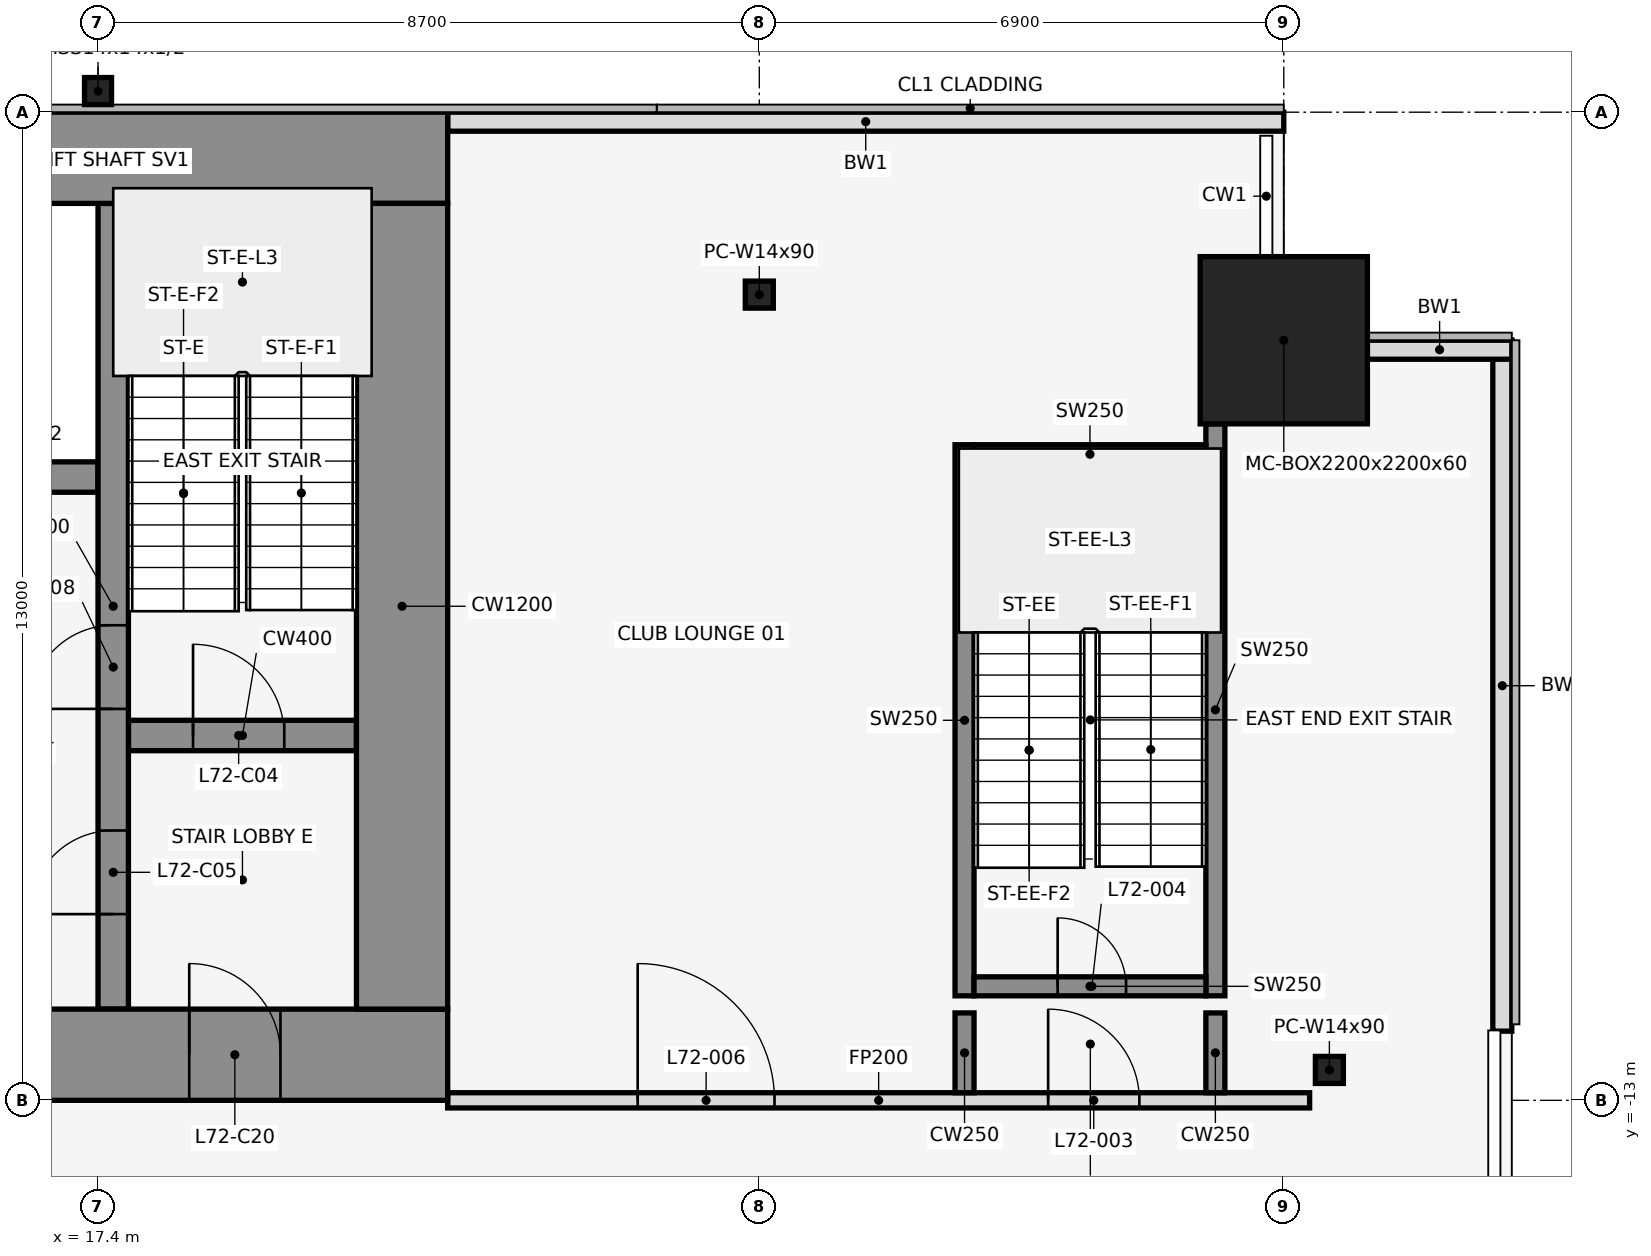
"""IFC4 building model, lengths in metres.
Left out: names, types, materials, properties, quantities, classifications, styles, units other than length and angle.
Written with IfcOpenShell. Run it as: python <this file> out.ifc"""

import sys

from ifc_helpers import new_model, si_unit, direction, frame, frame_2d, origin, origin_2d, place, context, subcontext, project, spatial, rectangle, hollow_rectangle, i_section, extrude, element, fill, save


model = new_model("IFC4")
c1 = context("Model", 3, precision=1e-05, world=origin(), true_north=direction((0.0, 1.0)))
c2 = subcontext(c1, "Body", "Model", "MODEL_VIEW")
j1 = project(units=[si_unit("LENGTHUNIT", "METRE"), si_unit("PLANEANGLEUNIT", "RADIAN")], contexts=[c1])
p1 = place(None, origin())
s1 = spatial("IfcSite", under=j1, at=p1, CompositionType="ELEMENT")
p2 = place(p1, origin())
s2 = spatial("IfcBuilding", under=s1, at=p2, CompositionType="ELEMENT")
p3 = place(p2, frame((0.0, 0.0, 320.0)))
s3 = spatial("IfcBuildingStorey", under=s2, at=p3, CompositionType="ELEMENT", Elevation=320.0)
p4 = place(p3, frame((26.1, -2.4, 0.0), z_axis=(0.0, 0.0, 1.0), x_axis=(1.0, 0.0, 0.0)))
e1 = element("IfcColumn", 1, at=p4, inside=s3, PredefinedType="COLUMN", context=c2, shape_type="SweptSolid", body=[
    extrude(i_section(OverallWidth=0.368, OverallDepth=0.356, WebThickness=0.011, FlangeThickness=0.018, at=origin_2d()), origin(), (0.0, 0.0, 1.0), 4.5),
])
p5 = place(p3, frame((33.0, -3.0, 0.0), z_axis=(0.0, 0.0, 1.0), x_axis=(1.0, 0.0, 0.0)))
e2 = element("IfcColumn", 2, at=p5, inside=s3, PredefinedType="COLUMN", context=c2, shape_type="SweptSolid", body=[
    extrude(hollow_rectangle(XDim=2.2, YDim=2.2, WallThickness=0.06, at=origin_2d()), origin(), (0.0, 0.0, 1.0), 4.5),
])
p6 = place(p3, frame((17.4, 0.278, 0.0), z_axis=(0.0, 0.0, 1.0), x_axis=(1.0, 0.0, 0.0)))
e3 = element("IfcColumn", 3, at=p6, inside=s3, PredefinedType="COLUMN", context=c2, shape_type="SweptSolid", body=[
    extrude(hollow_rectangle(XDim=0.356, YDim=0.356, WallThickness=0.012, at=origin_2d()), origin(), (0.0, 0.0, 1.0), 4.5),
])
p7 = place(p3, frame((33.6, -12.6, 0.0), z_axis=(0.0, 0.0, 1.0), x_axis=(1.0, 0.0, 0.0)))
e4 = element("IfcColumn", 4, at=p7, inside=s3, PredefinedType="COLUMN", context=c2, shape_type="SweptSolid", body=[
    extrude(i_section(OverallWidth=0.368, OverallDepth=0.356, WebThickness=0.011, FlangeThickness=0.018, at=origin_2d()), origin(), (0.0, 0.0, 1.0), 4.5),
])
p8 = place(p3, frame((33.0, -0.125, 0.0), z_axis=(0.0, 0.0, 1.0), x_axis=(-1.0, 0.0, 0.0)))
e5 = element("IfcWall", 5, at=p8, inside=s3, PredefinedType="STANDARD", context=c2, shape_type="SweptSolid", body=[
    extrude(rectangle(XDim=11.0, YDim=0.25, at=frame_2d((5.5, 0.0))), origin(), (0.0, 0.0, 1.0), 4.35),
])
p9 = place(p3, frame((35.875, -12.09, 0.0), z_axis=(0.0, 0.0, 1.0), x_axis=(0.0, 1.0, 0.0)))
e6 = element("IfcWall", 6, at=p9, inside=s3, PredefinedType="STANDARD", context=c2, shape_type="SweptSolid", body=[
    extrude(rectangle(XDim=9.09, YDim=0.25, at=frame_2d((4.545, 0.0))), origin(), (0.0, 0.0, 1.0), 4.35),
])
p10 = place(p3, frame((36.0, -3.125, 0.0), z_axis=(0.0, 0.0, 1.0), x_axis=(-1.0, 0.0, 0.0)))
e7 = element("IfcWall", 7, at=p10, inside=s3, PredefinedType="STANDARD", context=c2, shape_type="SweptSolid", body=[
    extrude(rectangle(XDim=1.9, YDim=0.25, at=frame_2d((0.95, 0.0))), origin(), (0.0, 0.0, 1.0), 4.35),
])
p11 = place(p3, frame((28.8, -11.625, 0.0), z_axis=(0.0, 0.0, 1.0), x_axis=(0.0, 1.0, 0.0)))
e8 = element("IfcWall", 8, at=p11, inside=s3, PredefinedType="SHEAR", context=c2, shape_type="SweptSolid", body=[
    extrude(rectangle(XDim=7.25, YDim=0.25, at=frame_2d((3.625, 0.0))), origin(), (0.0, 0.0, 1.0), 4.5),
])
p12 = place(p3, frame((32.1, -11.625, 0.0), z_axis=(0.0, 0.0, 1.0), x_axis=(0.0, 1.0, 0.0)))
e9 = element("IfcWall", 9, at=p12, inside=s3, PredefinedType="SHEAR", context=c2, shape_type="SweptSolid", body=[
    extrude(rectangle(XDim=7.525, YDim=0.25, at=frame_2d((3.762, 0.0))), origin(), (0.0, 0.0, 1.0), 4.5),
])
p13 = place(p3, frame((28.925, -11.5, 0.0), z_axis=(0.0, 0.0, 1.0), x_axis=(1.0, 0.0, 0.0)))
e10 = element("IfcWall", 10, at=p13, inside=s3, PredefinedType="SHEAR", context=c2, shape_type="SweptSolid", body=[
    extrude(rectangle(XDim=3.05, YDim=0.25, at=frame_2d((1.525, 0.0))), origin(), (0.0, 0.0, 1.0), 4.5),
])
p14 = place(p13, frame((1.1, 0.0, 0.0)))
e11 = element("IfcOpeningElement", 11, at=p14, cuts=e10, PredefinedType="OPENING", context=c2, shape_type="SweptSolid", body=[
    extrude(rectangle(XDim=0.9, YDim=2.1, at=frame_2d((0.45, 1.05))), frame((0.0, 0.137, 0.0), z_axis=(0.0, -1.0, 0.0), x_axis=(1.0, 0.0, 0.0)), (0.0, 0.0, 1.0), 0.274),
])
p15 = place(p3, frame((28.925, -4.5, 0.0), z_axis=(0.0, 0.0, 1.0), x_axis=(1.0, 0.0, 0.0)))
e12 = element("IfcWall", 12, at=p15, inside=s3, PredefinedType="SHEAR", context=c2, shape_type="SweptSolid", body=[
    extrude(rectangle(XDim=3.05, YDim=0.25, at=frame_2d((1.525, 0.0))), origin(), (0.0, 0.0, 1.0), 4.5),
])
p16 = place(p3, frame((22.0, -13.0, 0.0), z_axis=(0.0, 0.0, 1.0), x_axis=(1.0, 0.0, 0.0)))
e13 = element("IfcWall", 13, at=p16, inside=s3, PredefinedType="PARTITIONING", context=c2, shape_type="SweptSolid", body=[
    extrude(rectangle(XDim=11.34, YDim=0.2, at=frame_2d((5.67, 0.0))), origin(), (0.0, 0.0, 1.0), 3.418),
])
p17 = place(p16, frame((7.9, 0.0, 0.0)))
e14 = element("IfcOpeningElement", 14, at=p17, cuts=e13, PredefinedType="OPENING", context=c2, shape_type="SweptSolid", body=[
    extrude(rectangle(XDim=1.2, YDim=2.1, at=frame_2d((0.6, 1.05))), frame((0.0, 0.112, 0.0), z_axis=(0.0, -1.0, 0.0), x_axis=(1.0, 0.0, 0.0)), (0.0, 0.0, 1.0), 0.224),
])
p18 = place(p16, frame((2.5, 0.0, 0.0)))
e15 = element("IfcOpeningElement", 15, at=p18, cuts=e13, PredefinedType="OPENING", context=c2, shape_type="SweptSolid", body=[
    extrude(rectangle(XDim=1.8, YDim=2.1, at=frame_2d((0.9, 1.05))), frame((0.0, 0.112, 0.0), z_axis=(0.0, -1.0, 0.0), x_axis=(1.0, 0.0, 0.0)), (0.0, 0.0, 1.0), 0.224),
])
for number, where, z_axis, x_axis in (
    (16, (28.8, -12.9, 0.0), (0.0, 0.0, 1.0), (0.0, 1.0, 0.0)),
    (17, (32.1, -12.9, 0.0), (0.0, 0.0, 1.0), (0.0, 1.0, 0.0)),
):
    element("IfcWall", number, at=place(p3, frame(where, z_axis=z_axis, x_axis=x_axis)), inside=s3, PredefinedType="SHEAR", context=c2, shape_type="SweptSolid", body=[
        extrude(rectangle(XDim=1.05, YDim=0.25, at=frame_2d((0.525, 0.0))), origin(), (0.0, 0.0, 1.0), 4.5),
    ])
p19 = place(p3, frame((17.8, -8.2, 0.0), z_axis=(0.0, 0.0, 1.0), x_axis=(1.0, 0.0, 0.0)))
e18 = element("IfcWall", 18, at=p19, inside=s3, PredefinedType="SHEAR", context=c2, shape_type="SweptSolid", body=[
    extrude(rectangle(XDim=3.0, YDim=0.4, at=frame_2d((1.5, 0.0))), origin(), (0.0, 0.0, 1.0), 4.5),
])
p20 = place(p19, frame((0.85, 0.0, 0.0)))
e19 = element("IfcOpeningElement", 19, at=p20, cuts=e18, PredefinedType="OPENING", context=c2, shape_type="SweptSolid", body=[
    extrude(rectangle(XDim=1.2, YDim=2.1, at=frame_2d((0.6, 1.05))), frame((0.0, 0.212, 0.0), z_axis=(0.0, -1.0, 0.0), x_axis=(1.0, 0.0, 0.0)), (0.0, 0.0, 1.0), 0.424),
])
p21 = place(p3, frame((3.8, -4.8, 0.0), z_axis=(0.0, 0.0, 1.0), x_axis=(1.0, 0.0, 0.0)))
e20 = element("IfcWall", 20, at=p21, inside=s3, PredefinedType="SHEAR", context=c2, shape_type="SweptSolid", body=[
    extrude(rectangle(XDim=13.6, YDim=0.4, at=frame_2d((6.8, 0.0))), origin(), (0.0, 0.0, 1.0), 4.5),
])
p22 = place(p21, frame((0.75, 0.0, 0.0)))
e21 = element("IfcOpeningElement", 21, at=p22, cuts=e20, PredefinedType="OPENING", context=c2, shape_type="SweptSolid", body=[
    extrude(rectangle(XDim=1.2, YDim=2.1, at=frame_2d((0.6, 1.05))), frame((0.0, 0.212, 0.0), z_axis=(0.0, -1.0, 0.0), x_axis=(1.0, 0.0, 0.0)), (0.0, 0.0, 1.0), 0.424),
])
p23 = place(p21, frame((3.65, 0.0, 0.0)))
e22 = element("IfcOpeningElement", 22, at=p23, cuts=e20, PredefinedType="OPENING", context=c2, shape_type="SweptSolid", body=[
    extrude(rectangle(XDim=1.2, YDim=2.1, at=frame_2d((0.6, 1.05))), frame((0.0, 0.212, 0.0), z_axis=(0.0, -1.0, 0.0), x_axis=(1.0, 0.0, 0.0)), (0.0, 0.0, 1.0), 0.424),
])
p24 = place(p21, frame((6.65, 0.0, 0.0)))
e23 = element("IfcOpeningElement", 23, at=p24, cuts=e20, PredefinedType="OPENING", context=c2, shape_type="SweptSolid", body=[
    extrude(rectangle(XDim=1.2, YDim=2.1, at=frame_2d((0.6, 1.05))), frame((0.0, 0.212, 0.0), z_axis=(0.0, -1.0, 0.0), x_axis=(1.0, 0.0, 0.0)), (0.0, 0.0, 1.0), 0.424),
])
p25 = place(p21, frame((9.45, 0.0, 0.0)))
e24 = element("IfcOpeningElement", 24, at=p25, cuts=e20, PredefinedType="OPENING", context=c2, shape_type="SweptSolid", body=[
    extrude(rectangle(XDim=1.1, YDim=2.1, at=frame_2d((0.55, 1.05))), frame((0.0, 0.212, 0.0), z_axis=(0.0, -1.0, 0.0), x_axis=(1.0, 0.0, 0.0)), (0.0, 0.0, 1.0), 0.424),
])
p26 = place(p21, frame((11.85, 0.0, 0.0)))
e25 = element("IfcOpeningElement", 25, at=p26, cuts=e20, PredefinedType="OPENING", context=c2, shape_type="SweptSolid", body=[
    extrude(rectangle(XDim=1.1, YDim=2.1, at=frame_2d((0.55, 1.05))), frame((0.0, 0.212, 0.0), z_axis=(0.0, -1.0, 0.0), x_axis=(1.0, 0.0, 0.0)), (0.0, 0.0, 1.0), 0.424),
])
p27 = place(p3, frame((17.6, -11.8, 0.0), z_axis=(0.0, 0.0, 1.0), x_axis=(0.0, 1.0, 0.0)))
e26 = element("IfcWall", 26, at=p27, inside=s3, PredefinedType="SHEAR", context=c2, shape_type="SweptSolid", body=[
    extrude(rectangle(XDim=10.6, YDim=0.4, at=frame_2d((5.3, 0.0))), origin(), (0.0, 0.0, 1.0), 4.5),
])
p28 = place(p27, frame((1.25, 0.0, 0.0)))
e27 = element("IfcOpeningElement", 27, at=p28, cuts=e26, PredefinedType="OPENING", context=c2, shape_type="SweptSolid", body=[
    extrude(rectangle(XDim=1.1, YDim=2.1, at=frame_2d((0.55, 1.05))), frame((0.0, 0.212, 0.0), z_axis=(0.0, -1.0, 0.0), x_axis=(1.0, 0.0, 0.0)), (0.0, 0.0, 1.0), 0.424),
])
p29 = place(p27, frame((3.95, 0.0, 0.0)))
e28 = element("IfcOpeningElement", 28, at=p29, cuts=e26, PredefinedType="OPENING", context=c2, shape_type="SweptSolid", body=[
    extrude(rectangle(XDim=1.1, YDim=2.1, at=frame_2d((0.55, 1.05))), frame((0.0, 0.212, 0.0), z_axis=(0.0, -1.0, 0.0), x_axis=(1.0, 0.0, 0.0)), (0.0, 0.0, 1.0), 0.424),
])
p30 = place(p3, frame((-22.0, -0.6, 0.0), z_axis=(0.0, 0.0, 1.0), x_axis=(1.0, 0.0, 0.0)))
e29 = element("IfcWall", 29, at=p30, inside=s3, PredefinedType="SHEAR", context=c2, shape_type="SweptSolid", body=[
    extrude(rectangle(XDim=44.0, YDim=1.2, at=frame_2d((22.0, 0.0))), origin(), (0.0, 0.0, 1.0), 4.5),
])
p31 = place(p30, frame((18.55, 0.0, 0.0)))
e30 = element("IfcOpeningElement", 30, at=p31, cuts=e29, PredefinedType="OPENING", context=c2, shape_type="SweptSolid", body=[
    extrude(rectangle(XDim=0.9, YDim=2.1, at=frame_2d((0.45, 1.05))), frame((0.0, 0.612, 0.0), z_axis=(0.0, -1.0, 0.0), x_axis=(1.0, 0.0, 0.0)), (0.0, 0.0, 1.0), 1.224),
])
p32 = place(p30, frame((24.55, 0.0, 0.0)))
e31 = element("IfcOpeningElement", 31, at=p32, cuts=e29, PredefinedType="OPENING", context=c2, shape_type="SweptSolid", body=[
    extrude(rectangle(XDim=0.9, YDim=2.1, at=frame_2d((0.45, 1.05))), frame((0.0, 0.612, 0.0), z_axis=(0.0, -1.0, 0.0), x_axis=(1.0, 0.0, 0.0)), (0.0, 0.0, 1.0), 1.224),
])
p33 = place(p3, frame((-22.0, -12.4, 0.0), z_axis=(0.0, 0.0, 1.0), x_axis=(1.0, 0.0, 0.0)))
e32 = element("IfcWall", 32, at=p33, inside=s3, PredefinedType="SHEAR", context=c2, shape_type="SweptSolid", body=[
    extrude(rectangle(XDim=44.0, YDim=1.2, at=frame_2d((22.0, 0.0))), origin(), (0.0, 0.0, 1.0), 4.5),
])
p34 = place(p33, frame((2.2, 0.0, 0.0)))
e33 = element("IfcOpeningElement", 33, at=p34, cuts=e32, PredefinedType="OPENING", context=c2, shape_type="SweptSolid", body=[
    extrude(rectangle(XDim=1.2, YDim=2.1, at=frame_2d((0.6, 1.05))), frame((0.0, 0.612, 0.0), z_axis=(0.0, -1.0, 0.0), x_axis=(1.0, 0.0, 0.0)), (0.0, 0.0, 1.0), 1.224),
])
p35 = place(p33, frame((21.4, 0.0, 0.0)))
e34 = element("IfcOpeningElement", 34, at=p35, cuts=e32, PredefinedType="OPENING", context=c2, shape_type="SweptSolid", body=[
    extrude(rectangle(XDim=1.2, YDim=2.1, at=frame_2d((0.6, 1.05))), frame((0.0, 0.612, 0.0), z_axis=(0.0, -1.0, 0.0), x_axis=(1.0, 0.0, 0.0)), (0.0, 0.0, 1.0), 1.224),
])
p36 = place(p33, frame((40.6, 0.0, 0.0)))
e35 = element("IfcOpeningElement", 35, at=p36, cuts=e32, PredefinedType="OPENING", context=c2, shape_type="SweptSolid", body=[
    extrude(rectangle(XDim=1.2, YDim=2.1, at=frame_2d((0.6, 1.05))), frame((0.0, 0.612, 0.0), z_axis=(0.0, -1.0, 0.0), x_axis=(1.0, 0.0, 0.0)), (0.0, 0.0, 1.0), 1.224),
])
p37 = place(p33, frame((16.0, 0.0, 0.0)))
e36 = element("IfcOpeningElement", 36, at=p37, cuts=e32, PredefinedType="OPENING", context=c2, shape_type="SweptSolid", body=[
    extrude(rectangle(XDim=1.8, YDim=2.1, at=frame_2d((0.9, 1.05))), frame((0.0, 0.612, 0.0), z_axis=(0.0, -1.0, 0.0), x_axis=(1.0, 0.0, 0.0)), (0.0, 0.0, 1.0), 1.224),
])
p38 = place(p33, frame((6.3, 0.0, 0.0)))
e37 = element("IfcOpeningElement", 37, at=p38, cuts=e32, PredefinedType="OPENING", context=c2, shape_type="SweptSolid", body=[
    extrude(rectangle(XDim=1.2, YDim=2.1, at=frame_2d((0.6, 1.05))), frame((0.0, 0.612, 0.0), z_axis=(0.0, -1.0, 0.0), x_axis=(1.0, 0.0, 0.0)), (0.0, 0.0, 1.0), 1.224),
])
p39 = place(p33, frame((26.2, 0.0, 0.0)))
e38 = element("IfcOpeningElement", 38, at=p39, cuts=e32, PredefinedType="OPENING", context=c2, shape_type="SweptSolid", body=[
    extrude(rectangle(XDim=1.8, YDim=2.1, at=frame_2d((0.9, 1.05))), frame((0.0, 0.612, 0.0), z_axis=(0.0, -1.0, 0.0), x_axis=(1.0, 0.0, 0.0)), (0.0, 0.0, 1.0), 1.224),
])
p40 = place(p33, frame((36.5, 0.0, 0.0)))
e39 = element("IfcOpeningElement", 39, at=p40, cuts=e32, PredefinedType="OPENING", context=c2, shape_type="SweptSolid", body=[
    extrude(rectangle(XDim=1.2, YDim=2.1, at=frame_2d((0.6, 1.05))), frame((0.0, 0.612, 0.0), z_axis=(0.0, -1.0, 0.0), x_axis=(1.0, 0.0, 0.0)), (0.0, 0.0, 1.0), 1.224),
])
p41 = place(p3, frame((21.4, -11.8, 0.0), z_axis=(0.0, 0.0, 1.0), x_axis=(0.0, 1.0, 0.0)))
e40 = element("IfcWall", 40, at=p41, inside=s3, PredefinedType="SHEAR", context=c2, shape_type="SweptSolid", body=[
    extrude(rectangle(XDim=10.6, YDim=1.2, at=frame_2d((5.3, 0.0))), origin(), (0.0, 0.0, 1.0), 4.5),
])
p42 = place(p17, origin())
e41 = element("IfcDoor", 41, at=p42, inside=s3, OperationType="SINGLE_SWING_RIGHT", PredefinedType="DOOR", context=c2, shape_type="SweptSolid", body=[
    extrude(rectangle(XDim=1.2, YDim=2.1, at=frame_2d((0.6, 1.05))), frame((0.0, 0.025, 0.0), z_axis=(0.0, -1.0, 0.0), x_axis=(1.0, 0.0, 0.0)), (0.0, 0.0, 1.0), 0.05),
])
fill(e14, e41)
p43 = place(p14, origin())
e42 = element("IfcDoor", 42, at=p43, inside=s3, OperationType="SINGLE_SWING_LEFT", PredefinedType="DOOR", context=c2, shape_type="SweptSolid", body=[
    extrude(rectangle(XDim=0.9, YDim=2.1, at=frame_2d((0.45, 1.05))), frame((0.0, 0.025, 0.0), z_axis=(0.0, -1.0, 0.0), x_axis=(1.0, 0.0, 0.0)), (0.0, 0.0, 1.0), 0.05),
])
fill(e11, e42)
p44 = place(p18, origin())
e43 = element("IfcDoor", 43, at=p44, inside=s3, OperationType="SINGLE_SWING_LEFT", PredefinedType="DOOR", context=c2, shape_type="SweptSolid", body=[
    extrude(rectangle(XDim=1.8, YDim=2.1, at=frame_2d((0.9, 1.05))), frame((0.0, 0.025, 0.0), z_axis=(0.0, -1.0, 0.0), x_axis=(1.0, 0.0, 0.0)), (0.0, 0.0, 1.0), 0.05),
])
fill(e15, e43)
p45 = place(p20, origin())
e44 = element("IfcDoor", 44, at=p45, inside=s3, OperationType="SINGLE_SWING_RIGHT", PredefinedType="DOOR", context=c2, shape_type="SweptSolid", body=[
    extrude(rectangle(XDim=1.2, YDim=2.1, at=frame_2d((0.6, 1.05))), frame((0.0, 0.025, 0.0), z_axis=(0.0, -1.0, 0.0), x_axis=(1.0, 0.0, 0.0)), (0.0, 0.0, 1.0), 0.05),
])
fill(e19, e44)
p46 = place(p28, origin())
e45 = element("IfcDoor", 45, at=p46, inside=s3, OperationType="SINGLE_SWING_LEFT", PredefinedType="DOOR", context=c2, shape_type="SweptSolid", body=[
    extrude(rectangle(XDim=1.1, YDim=2.1, at=frame_2d((0.55, 1.05))), frame((0.0, 0.025, 0.0), z_axis=(0.0, -1.0, 0.0), x_axis=(1.0, 0.0, 0.0)), (0.0, 0.0, 1.0), 0.05),
])
fill(e27, e45)
p47 = place(p29, origin())
e46 = element("IfcDoor", 46, at=p47, inside=s3, OperationType="SINGLE_SWING_RIGHT", PredefinedType="DOOR", context=c2, shape_type="SweptSolid", body=[
    extrude(rectangle(XDim=1.1, YDim=2.1, at=frame_2d((0.55, 1.05))), frame((0.0, 0.025, 0.0), z_axis=(0.0, -1.0, 0.0), x_axis=(1.0, 0.0, 0.0)), (0.0, 0.0, 1.0), 0.05),
])
fill(e28, e46)
p48 = place(p36, frame((1.2, 0.0, 0.0), z_axis=(0.0, 0.0, 1.0), x_axis=(-1.0, 0.0, 0.0)))
e47 = element("IfcDoor", 47, at=p48, inside=s3, OperationType="SINGLE_SWING_RIGHT", PredefinedType="DOOR", context=c2, shape_type="SweptSolid", body=[
    extrude(rectangle(XDim=1.2, YDim=2.1, at=frame_2d((0.6, 1.05))), frame((0.0, 0.025, 0.0), z_axis=(0.0, -1.0, 0.0), x_axis=(1.0, 0.0, 0.0)), (0.0, 0.0, 1.0), 0.05),
])
fill(e35, e47)
save(model, sys.argv[1])
